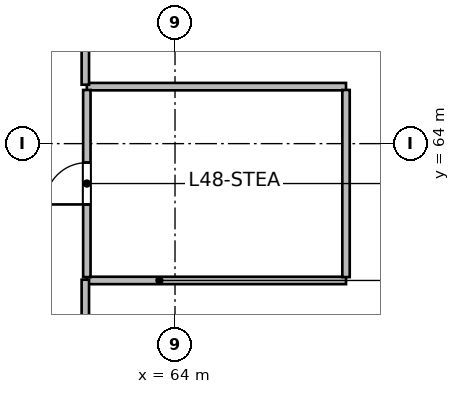
"""IFC4 building model, lengths in metres.
Left out: names, types, materials, properties, quantities, classifications, styles, units other than length and angle.
Written with IfcOpenShell. Run it as: python <this file> out.ifc"""

import sys

from ifc_helpers import new_model, si_unit, direction, frame, frame_2d, origin, place, context, subcontext, project, spatial, rectangle, extrude, source, transform, mapped, element, fill, save


model = new_model("IFC4")
c1 = context("Model", 3, precision=1e-05, world=origin(), true_north=direction((0.0, 1.0)))
c2 = subcontext(c1, "Body", "Model", "MODEL_VIEW")
j1 = project(units=[si_unit("LENGTHUNIT", "METRE"), si_unit("PLANEANGLEUNIT", "RADIAN")], contexts=[c1])
p1 = place(None, origin())
s1 = spatial("IfcSite", under=j1, at=p1, CompositionType="ELEMENT")
p2 = place(p1, origin())
s2 = spatial("IfcBuilding", under=s1, at=p2, CompositionType="ELEMENT")
p3 = place(p2, frame((0.0, 0.0, 199.2)))
s3 = spatial("IfcBuildingStorey", under=s2, at=p3, CompositionType="ELEMENT", Elevation=199.2)
m1 = source(origin(), c2, "Body", "SweptSolid", [
    extrude(rectangle(XDim=6.82, YDim=0.195, at=frame_2d((3.41, 0.0))), origin(), (0.0, 0.0, 1.0), 4.54),
])
for number, where, z_axis, x_axis in (
    (1, (61.68, 60.4, 0.0), (0.0, 0.0, 1.0), (1.0, 0.0, 0.0)),
    (2, (61.68, 65.5, 0.0), (0.0, 0.0, 1.0), (1.0, 0.0, 0.0)),
):
    element("IfcWall", number, at=place(p3, frame(where, z_axis=z_axis, x_axis=x_axis)), inside=s3, PredefinedType="PARTITIONING", context=c2, shape_type="MappedRepresentation", body=[
        mapped(m1, transform((0.0, 0.0, 0.0), scale=1.0)),
    ])
m2 = source(origin(), c2, "Body", "SweptSolid", [
    extrude(rectangle(XDim=4.925, YDim=0.195, at=frame_2d((2.462, 0.0))), origin(), (0.0, 0.0, 1.0), 4.54),
])
p4 = place(p3, frame((61.68, 60.488, 0.0), z_axis=(0.0, 0.0, 1.0), x_axis=(0.0, 1.0, 0.0)))
e3 = element("IfcWall", 3, at=p4, inside=s3, PredefinedType="PARTITIONING", context=c2, shape_type="MappedRepresentation", body=[
    mapped(m2, transform((0.0, 0.0, 0.0), scale=1.0)),
])
p5 = place(p4, frame((1.912, 0.0, 0.0)))
e4 = element("IfcOpeningElement", 4, at=p5, cuts=e3, PredefinedType="OPENING", context=c2, shape_type="SweptSolid", body=[
    extrude(rectangle(XDim=1.1, YDim=2.15, at=frame_2d((0.55, 1.075))), frame((0.0, 0.107, 0.0), z_axis=(0.0, -1.0, 0.0), x_axis=(1.0, 0.0, 0.0)), (0.0, 0.0, 1.0), 0.215),
])
p6 = place(p3, frame((68.5, 60.488, 0.0), z_axis=(0.0, 0.0, 1.0), x_axis=(0.0, 1.0, 0.0)))
e5 = element("IfcWall", 5, at=p6, inside=s3, PredefinedType="PARTITIONING", context=c2, shape_type="MappedRepresentation", body=[
    mapped(m2, transform((0.0, 0.0, 0.0), scale=1.0)),
])
m3 = source(origin(), c2, "Body", "SweptSolid", [
    extrude(rectangle(XDim=2.46, YDim=0.195, at=frame_2d((1.23, 0.0))), origin(), (0.0, 0.0, 1.0), 4.54),
])
p7 = place(p3, frame((61.64, 57.96, 0.0), z_axis=(0.0, 0.0, 1.0), x_axis=(0.0, 1.0, 0.0)))
e6 = element("IfcWall", 6, at=p7, inside=s3, PredefinedType="PARTITIONING", context=c2, shape_type="MappedRepresentation", body=[
    mapped(m3, transform((0.0, 0.0, 0.0), scale=1.0)),
])
m4 = source(origin(), c2, "Body", "SweptSolid", [
    extrude(rectangle(XDim=11.619, YDim=0.195, at=frame_2d((5.809, 0.0))), origin(), (0.0, 0.0, 1.0), 4.54),
])
p8 = place(p3, frame((61.64, 65.55, 0.0), z_axis=(0.0, 0.0, 1.0), x_axis=(0.0, 1.0, 0.0)))
e7 = element("IfcWall", 7, at=p8, inside=s3, PredefinedType="PARTITIONING", context=c2, shape_type="MappedRepresentation", body=[
    mapped(m4, transform((0.0, 0.0, 0.0), scale=1.0)),
])
m5 = source(origin(), c2, "Body", "SweptSolid", [
    extrude(rectangle(XDim=1.1, YDim=2.15, at=frame_2d((0.55, 1.075))), frame((0.0, 0.025, 0.0), z_axis=(0.0, -1.0, 0.0), x_axis=(1.0, 0.0, 0.0)), (0.0, 0.0, 1.0), 0.05),
])
p9 = place(p5, origin())
e8 = element("IfcDoor", 8, at=p9, inside=s3, OperationType="SINGLE_SWING_LEFT", PredefinedType="DOOR", context=c2, shape_type="MappedRepresentation", body=[
    mapped(m5, transform((0.0, 0.0, 0.0), scale=1.0)),
])
fill(e4, e8)
save(model, sys.argv[1])
